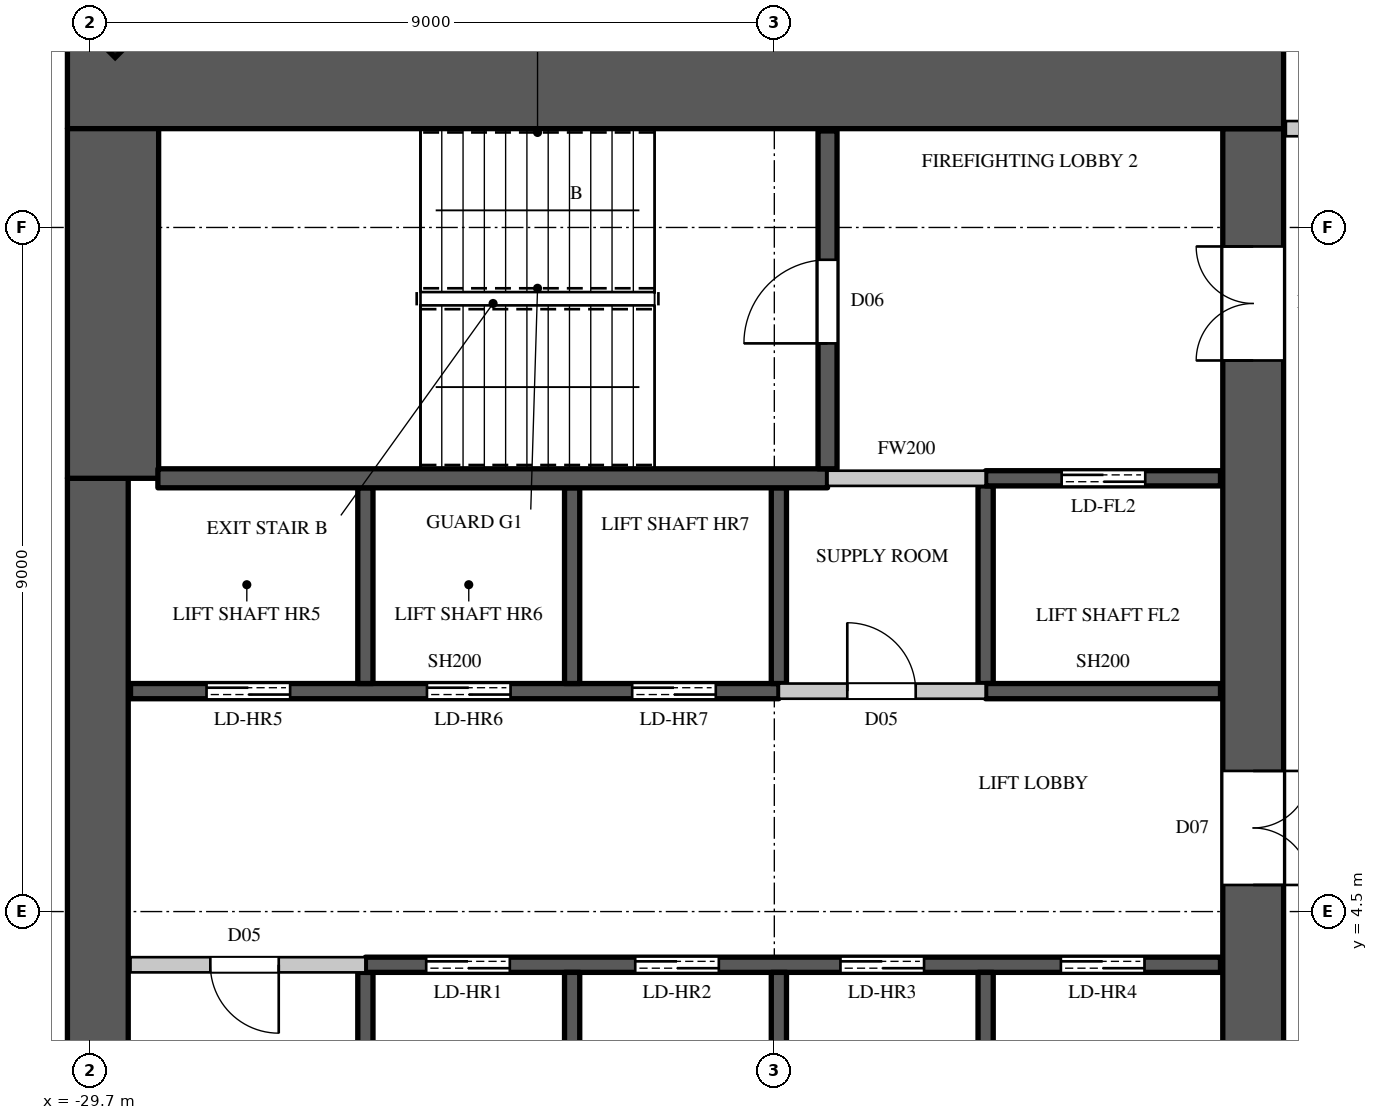
"""IFC4 building model, lengths in metres.
Left out: names, types, materials, properties, quantities, classifications, styles, units other than length and angle.
Written with IfcOpenShell. Run it as: python <this file> out.ifc"""

import sys

from ifc_helpers import new_model, si_unit, direction, frame, frame_2d, origin, origin_2d, place, context, subcontext, project, spatial, rectangle, extrude, element, fill, save


model = new_model("IFC4")
c1 = context("Model", 3, precision=1e-05, world=origin(), true_north=direction((0.0, 1.0)))
c2 = subcontext(c1, "Body", "Model", "MODEL_VIEW")
j1 = project(units=[si_unit("LENGTHUNIT", "METRE"), si_unit("PLANEANGLEUNIT", "RADIAN")], contexts=[c1])
p1 = place(None, origin())
s1 = spatial("IfcSite", under=j1, at=p1, CompositionType="ELEMENT")
p2 = place(p1, origin())
s2 = spatial("IfcBuilding", under=s1, at=p2, CompositionType="ELEMENT")
p3 = place(p2, frame((0.0, 0.0, 234.3)))
s3 = spatial("IfcBuildingStorey", under=s2, at=p3, CompositionType="ELEMENT", Elevation=234.3)
p4 = place(p3, frame((-29.443, 16.443, 0.0), z_axis=(0.0, 0.0, 1.0), x_axis=(-0.707106781187, -0.707106781187, 0.0)))
e1 = element("IfcColumn", 1, at=p4, inside=s3, PredefinedType="COLUMN", context=c2, shape_type="SweptSolid", body=[
    extrude(rectangle(XDim=0.9, YDim=1.1, at=origin_2d()), origin(), (0.0, 0.0, 1.0), 4.1),
])
p5 = place(p3, frame((-30.0, 15.4, 0.0), z_axis=(0.0, 0.0, 1.0), x_axis=(1.0, 0.0, 0.0)))
e2 = element("IfcWall", 2, at=p5, inside=s3, PredefinedType="SHEAR", context=c2, shape_type="SweptSolid", body=[
    extrude(rectangle(XDim=16.0, YDim=1.2, at=frame_2d((8.0, 0.0))), origin(), (0.0, 0.0, 1.0), 4.1),
])
p6 = place(p3, frame((-14.4, -14.8, 0.0), z_axis=(0.0, 0.0, 1.0), x_axis=(0.0, 1.0, 0.0)))
e3 = element("IfcWall", 3, at=p6, inside=s3, PredefinedType="SHEAR", context=c2, shape_type="SweptSolid", body=[
    extrude(rectangle(XDim=29.6, YDim=0.8, at=frame_2d((14.8, 0.0))), origin(), (0.0, 0.0, 1.0), 4.1),
])
p7 = place(p6, frame((1.55, 0.0, 0.0)))
e4 = element("IfcOpeningElement", 4, at=p7, cuts=e3, PredefinedType="OPENING", context=c2, shape_type="SweptSolid", body=[
    extrude(rectangle(XDim=1.5, YDim=2.4, at=frame_2d((0.75, 1.2))), frame((0.0, 0.41, 0.0), z_axis=(0.0, -1.0, 0.0), x_axis=(1.0, 0.0, 0.0)), (0.0, 0.0, 1.0), 0.82),
])
p8 = place(p6, frame((26.55, 0.0, 0.0)))
e5 = element("IfcOpeningElement", 5, at=p8, cuts=e3, PredefinedType="OPENING", context=c2, shape_type="SweptSolid", body=[
    extrude(rectangle(XDim=1.5, YDim=2.4, at=frame_2d((0.75, 1.2))), frame((0.0, 0.41, 0.0), z_axis=(0.0, -1.0, 0.0), x_axis=(1.0, 0.0, 0.0)), (0.0, 0.0, 1.0), 0.82),
])
p9 = place(p6, frame((8.45, 0.0, 0.0)))
e6 = element("IfcOpeningElement", 6, at=p9, cuts=e3, PredefinedType="OPENING", context=c2, shape_type="SweptSolid", body=[
    extrude(rectangle(XDim=1.5, YDim=2.4, at=frame_2d((0.75, 1.2))), frame((0.0, 0.41, 0.0), z_axis=(0.0, -1.0, 0.0), x_axis=(1.0, 0.0, 0.0)), (0.0, 0.0, 1.0), 0.82),
])
p10 = place(p6, frame((19.65, 0.0, 0.0)))
e7 = element("IfcOpeningElement", 7, at=p10, cuts=e3, PredefinedType="OPENING", context=c2, shape_type="SweptSolid", body=[
    extrude(rectangle(XDim=1.5, YDim=2.4, at=frame_2d((0.75, 1.2))), frame((0.0, 0.41, 0.0), z_axis=(0.0, -1.0, 0.0), x_axis=(1.0, 0.0, 0.0)), (0.0, 0.0, 1.0), 0.82),
])
p11 = place(p6, frame((14.5, 0.0, 0.0)))
e8 = element("IfcOpeningElement", 8, at=p11, cuts=e3, PredefinedType="OPENING", context=c2, shape_type="SweptSolid", body=[
    extrude(rectangle(XDim=0.6, YDim=2.0, at=frame_2d((0.3, 1.0))), frame((0.0, 0.41, 0.0), z_axis=(0.0, -1.0, 0.0), x_axis=(1.0, 0.0, 0.0)), (0.0, 0.0, 1.0), 0.82),
])
p12 = place(p3, frame((-29.6, -10.2, 0.0), z_axis=(0.0, 0.0, 1.0), x_axis=(0.0, 1.0, 0.0)))
e9 = element("IfcWall", 9, at=p12, inside=s3, PredefinedType="SHEAR", context=c2, shape_type="SweptSolid", body=[
    extrude(rectangle(XDim=20.4, YDim=0.8, at=frame_2d((10.2, 0.0))), origin(), (0.0, 0.0, 1.0), 4.1),
])
p13 = place(p3, frame((-29.4, 10.2, 0.0), z_axis=(0.0, 0.0, 1.0), x_axis=(0.0, 1.0, 0.0)))
e10 = element("IfcWall", 10, at=p13, inside=s3, PredefinedType="SHEAR", context=c2, shape_type="SweptSolid", body=[
    extrude(rectangle(XDim=4.6, YDim=1.2, at=frame_2d((2.3, 0.0))), origin(), (0.0, 0.0, 1.0), 4.1),
])
p14 = place(p3, frame((-29.17, 3.8, 0.0), z_axis=(0.0, 0.0, 1.0), x_axis=(1.0, 0.0, 0.0)))
e11 = element("IfcWall", 11, at=p14, inside=s3, PredefinedType="PARTITIONING", context=c2, shape_type="SweptSolid", body=[
    extrude(rectangle(XDim=3.09, YDim=0.2, at=frame_2d((1.545, 0.0))), origin(), (0.0, 0.0, 1.0), 3.8),
])
p15 = place(p14, frame((1.05, 0.0, 0.0)))
e12 = element("IfcOpeningElement", 12, at=p15, cuts=e11, PredefinedType="OPENING", context=c2, shape_type="SweptSolid", body=[
    extrude(rectangle(XDim=0.9, YDim=2.2, at=frame_2d((0.45, 1.1))), frame((0.0, 0.11, 0.0), z_axis=(0.0, -1.0, 0.0), x_axis=(1.0, 0.0, 0.0)), (0.0, 0.0, 1.0), 0.22),
])
p16 = place(p3, frame((-20.64, 7.4, 0.0), z_axis=(0.0, 0.0, 1.0), x_axis=(1.0, 0.0, 0.0)))
e13 = element("IfcWall", 13, at=p16, inside=s3, PredefinedType="PARTITIONING", context=c2, shape_type="SweptSolid", body=[
    extrude(rectangle(XDim=2.72, YDim=0.2, at=frame_2d((1.36, 0.0))), origin(), (0.0, 0.0, 1.0), 3.8),
])
p17 = place(p16, frame((0.9, 0.0, 0.0)))
e14 = element("IfcOpeningElement", 14, at=p17, cuts=e13, PredefinedType="OPENING", context=c2, shape_type="SweptSolid", body=[
    extrude(rectangle(XDim=0.9, YDim=2.2, at=frame_2d((0.45, 1.1))), frame((0.0, 0.11, 0.0), z_axis=(0.0, -1.0, 0.0), x_axis=(1.0, 0.0, 0.0)), (0.0, 0.0, 1.0), 0.22),
])
p18 = place(p3, frame((-20.0, 10.2, 0.0), z_axis=(0.0, 0.0, 1.0), x_axis=(1.0, 0.0, 0.0)))
e15 = element("IfcWall", 15, at=p18, inside=s3, PredefinedType="PARTITIONING", context=c2, shape_type="SweptSolid", body=[
    extrude(rectangle(XDim=2.08, YDim=0.2, at=frame_2d((1.04, 0.0))), origin(), (0.0, 0.0, 1.0), 3.8),
])
p19 = place(p3, frame((-13.97, 14.8, 0.0), z_axis=(0.0, 0.0, 1.0), x_axis=(1.0, 0.0, 0.0)))
e16 = element("IfcWall", 16, at=p19, inside=s3, PredefinedType="PARTITIONING", context=c2, shape_type="SweptSolid", body=[
    extrude(rectangle(XDim=2.87, YDim=0.2, at=frame_2d((1.435, 0.0))), origin(), (0.0, 0.0, 1.0), 3.8),
])
p20 = place(p3, frame((-29.17, 7.4, 0.0), z_axis=(0.0, 0.0, 1.0), x_axis=(1.0, 0.0, 0.0)))
e17 = element("IfcWall", 17, at=p20, inside=s3, PredefinedType="SHEAR", context=c2, shape_type="SweptSolid", body=[
    extrude(rectangle(XDim=8.53, YDim=0.2, at=frame_2d((4.265, 0.0))), origin(), (0.0, 0.0, 1.0), 3.8),
])
p21 = place(p20, frame((1.0, 0.0, 0.0)))
e18 = element("IfcOpeningElement", 18, at=p21, cuts=e17, PredefinedType="OPENING", context=c2, shape_type="SweptSolid", body=[
    extrude(rectangle(XDim=1.1, YDim=2.2, at=frame_2d((0.55, 1.1))), frame((0.0, 0.11, 0.0), z_axis=(0.0, -1.0, 0.0), x_axis=(1.0, 0.0, 0.0)), (0.0, 0.0, 1.0), 0.22),
])
p22 = place(p20, frame((3.9, 0.0, 0.0)))
e19 = element("IfcOpeningElement", 19, at=p22, cuts=e17, PredefinedType="OPENING", context=c2, shape_type="SweptSolid", body=[
    extrude(rectangle(XDim=1.1, YDim=2.2, at=frame_2d((0.55, 1.1))), frame((0.0, 0.11, 0.0), z_axis=(0.0, -1.0, 0.0), x_axis=(1.0, 0.0, 0.0)), (0.0, 0.0, 1.0), 0.22),
])
p23 = place(p20, frame((6.6, 0.0, 0.0)))
e20 = element("IfcOpeningElement", 20, at=p23, cuts=e17, PredefinedType="OPENING", context=c2, shape_type="SweptSolid", body=[
    extrude(rectangle(XDim=1.1, YDim=2.2, at=frame_2d((0.55, 1.1))), frame((0.0, 0.11, 0.0), z_axis=(0.0, -1.0, 0.0), x_axis=(1.0, 0.0, 0.0)), (0.0, 0.0, 1.0), 0.22),
])
p24 = place(p3, frame((-26.08, 1.1, 0.0), z_axis=(0.0, 0.0, 1.0), x_axis=(0.0, 1.0, 0.0)))
e21 = element("IfcWall", 21, at=p24, inside=s3, PredefinedType="SHEAR", context=c2, shape_type="SweptSolid", body=[
    extrude(rectangle(XDim=2.6, YDim=0.2, at=frame_2d((1.3, 0.0))), origin(), (0.0, 0.0, 1.0), 3.8),
])
p25 = place(p3, frame((-26.08, 3.8, 0.0), z_axis=(0.0, 0.0, 1.0), x_axis=(1.0, 0.0, 0.0)))
e22 = element("IfcWall", 22, at=p25, inside=s3, PredefinedType="SHEAR", context=c2, shape_type="SweptSolid", body=[
    extrude(rectangle(XDim=11.25, YDim=0.2, at=frame_2d((5.625, 0.0))), origin(), (0.0, 0.0, 1.0), 3.8),
])
p26 = place(p25, frame((0.8, 0.0, 0.0)))
e23 = element("IfcOpeningElement", 23, at=p26, cuts=e22, PredefinedType="OPENING", context=c2, shape_type="SweptSolid", body=[
    extrude(rectangle(XDim=1.1, YDim=2.2, at=frame_2d((0.55, 1.1))), frame((0.0, 0.11, 0.0), z_axis=(0.0, -1.0, 0.0), x_axis=(1.0, 0.0, 0.0)), (0.0, 0.0, 1.0), 0.22),
])
p27 = place(p25, frame((3.55, 0.0, 0.0)))
e24 = element("IfcOpeningElement", 24, at=p27, cuts=e22, PredefinedType="OPENING", context=c2, shape_type="SweptSolid", body=[
    extrude(rectangle(XDim=1.1, YDim=2.2, at=frame_2d((0.55, 1.1))), frame((0.0, 0.11, 0.0), z_axis=(0.0, -1.0, 0.0), x_axis=(1.0, 0.0, 0.0)), (0.0, 0.0, 1.0), 0.22),
])
p28 = place(p25, frame((6.25, 0.0, 0.0)))
e25 = element("IfcOpeningElement", 25, at=p28, cuts=e22, PredefinedType="OPENING", context=c2, shape_type="SweptSolid", body=[
    extrude(rectangle(XDim=1.1, YDim=2.2, at=frame_2d((0.55, 1.1))), frame((0.0, 0.11, 0.0), z_axis=(0.0, -1.0, 0.0), x_axis=(1.0, 0.0, 0.0)), (0.0, 0.0, 1.0), 0.22),
])
p29 = place(p25, frame((9.15, 0.0, 0.0)))
e26 = element("IfcOpeningElement", 26, at=p29, cuts=e22, PredefinedType="OPENING", context=c2, shape_type="SweptSolid", body=[
    extrude(rectangle(XDim=1.1, YDim=2.2, at=frame_2d((0.55, 1.1))), frame((0.0, 0.11, 0.0), z_axis=(0.0, -1.0, 0.0), x_axis=(1.0, 0.0, 0.0)), (0.0, 0.0, 1.0), 0.22),
])
p30 = place(p3, frame((-26.08, 7.5, 0.0), z_axis=(0.0, 0.0, 1.0), x_axis=(0.0, 1.0, 0.0)))
e27 = element("IfcWall", 27, at=p30, inside=s3, PredefinedType="SHEAR", context=c2, shape_type="SweptSolid", body=[
    extrude(rectangle(XDim=2.575, YDim=0.2, at=frame_2d((1.288, 0.0))), origin(), (0.0, 0.0, 1.0), 4.1),
])
p31 = place(p3, frame((-23.36, 1.1, 0.0), z_axis=(0.0, 0.0, 1.0), x_axis=(0.0, 1.0, 0.0)))
e28 = element("IfcWall", 28, at=p31, inside=s3, PredefinedType="SHEAR", context=c2, shape_type="SweptSolid", body=[
    extrude(rectangle(XDim=2.6, YDim=0.2, at=frame_2d((1.3, 0.0))), origin(), (0.0, 0.0, 1.0), 3.8),
])
p32 = place(p3, frame((-23.36, 7.5, 0.0), z_axis=(0.0, 0.0, 1.0), x_axis=(0.0, 1.0, 0.0)))
e29 = element("IfcWall", 29, at=p32, inside=s3, PredefinedType="SHEAR", context=c2, shape_type="SweptSolid", body=[
    extrude(rectangle(XDim=2.575, YDim=0.2, at=frame_2d((1.288, 0.0))), origin(), (0.0, 0.0, 1.0), 4.1),
])
p33 = place(p3, frame((-20.64, 1.1, 0.0), z_axis=(0.0, 0.0, 1.0), x_axis=(0.0, 1.0, 0.0)))
e30 = element("IfcWall", 30, at=p33, inside=s3, PredefinedType="SHEAR", context=c2, shape_type="SweptSolid", body=[
    extrude(rectangle(XDim=2.6, YDim=0.2, at=frame_2d((1.3, 0.0))), origin(), (0.0, 0.0, 1.0), 3.8),
])
p34 = place(p3, frame((-20.64, 7.5, 0.0), z_axis=(0.0, 0.0, 1.0), x_axis=(0.0, 1.0, 0.0)))
e31 = element("IfcWall", 31, at=p34, inside=s3, PredefinedType="SHEAR", context=c2, shape_type="SweptSolid", body=[
    extrude(rectangle(XDim=2.575, YDim=0.2, at=frame_2d((1.288, 0.0))), origin(), (0.0, 0.0, 1.0), 3.8),
])
p35 = place(p3, frame((-17.92, 1.1, 0.0), z_axis=(0.0, 0.0, 1.0), x_axis=(0.0, 1.0, 0.0)))
e32 = element("IfcWall", 32, at=p35, inside=s3, PredefinedType="SHEAR", context=c2, shape_type="SweptSolid", body=[
    extrude(rectangle(XDim=2.6, YDim=0.2, at=frame_2d((1.3, 0.0))), origin(), (0.0, 0.0, 1.0), 3.8),
])
p36 = place(p3, frame((-17.92, 7.5, 0.0), z_axis=(0.0, 0.0, 1.0), x_axis=(0.0, 1.0, 0.0)))
e33 = element("IfcWall", 33, at=p36, inside=s3, PredefinedType="SHEAR", context=c2, shape_type="SweptSolid", body=[
    extrude(rectangle(XDim=2.6, YDim=0.2, at=frame_2d((1.3, 0.0))), origin(), (0.0, 0.0, 1.0), 3.8),
])
p37 = place(p3, frame((-17.92, 7.4, 0.0), z_axis=(0.0, 0.0, 1.0), x_axis=(1.0, 0.0, 0.0)))
e34 = element("IfcWall", 34, at=p37, inside=s3, PredefinedType="SHEAR", context=c2, shape_type="SweptSolid", body=[
    extrude(rectangle(XDim=3.09, YDim=0.2, at=frame_2d((1.545, 0.0))), origin(), (0.0, 0.0, 1.0), 3.8),
])
p38 = place(p3, frame((-17.92, 10.2, 0.0), z_axis=(0.0, 0.0, 1.0), x_axis=(1.0, 0.0, 0.0)))
e35 = element("IfcWall", 35, at=p38, inside=s3, PredefinedType="SHEAR", context=c2, shape_type="SweptSolid", body=[
    extrude(rectangle(XDim=3.09, YDim=0.2, at=frame_2d((1.545, 0.0))), origin(), (0.0, 0.0, 1.0), 3.8),
])
p39 = place(p38, frame((1.0, 0.0, 0.0)))
e36 = element("IfcOpeningElement", 36, at=p39, cuts=e35, PredefinedType="OPENING", context=c2, shape_type="SweptSolid", body=[
    extrude(rectangle(XDim=1.1, YDim=2.2, at=frame_2d((0.55, 1.1))), frame((0.0, 0.11, 0.0), z_axis=(0.0, -1.0, 0.0), x_axis=(1.0, 0.0, 0.0)), (0.0, 0.0, 1.0), 0.22),
])
p40 = place(p3, frame((-28.81, 10.2, 0.0), z_axis=(0.0, 0.0, 1.0), x_axis=(1.0, 0.0, 0.0)))
e37 = element("IfcWall", 37, at=p40, inside=s3, PredefinedType="SHEAR", context=c2, shape_type="SweptSolid", body=[
    extrude(rectangle(XDim=8.81, YDim=0.25, at=frame_2d((4.405, 0.0))), origin(), (0.0, 0.0, 1.0), 3.8),
])
p41 = place(p3, frame((-20.0, 10.325, 0.0), z_axis=(0.0, 0.0, 1.0), x_axis=(0.0, 1.0, 0.0)))
e38 = element("IfcWall", 38, at=p41, inside=s3, PredefinedType="SHEAR", context=c2, shape_type="SweptSolid", body=[
    extrude(rectangle(XDim=4.445, YDim=0.25, at=frame_2d((2.223, 0.0))), origin(), (0.0, 0.0, 1.0), 3.8),
])
p42 = place(p41, frame((1.65, 0.0, 0.0)))
e39 = element("IfcOpeningElement", 39, at=p42, cuts=e38, PredefinedType="OPENING", context=c2, shape_type="SweptSolid", body=[
    extrude(rectangle(XDim=1.1, YDim=2.2, at=frame_2d((0.55, 1.1))), frame((0.0, 0.135, 0.0), z_axis=(0.0, -1.0, 0.0), x_axis=(1.0, 0.0, 0.0)), (0.0, 0.0, 1.0), 0.27),
])
p43 = place(p42, origin())
e40 = element("IfcDoor", 40, at=p43, inside=s3, OperationType="SINGLE_SWING_LEFT", PredefinedType="DOOR", context=c2, shape_type="SweptSolid", body=[
    extrude(rectangle(XDim=1.1, YDim=2.2, at=frame_2d((0.55, 1.1))), frame((0.0, 0.025, 0.0), z_axis=(0.0, -1.0, 0.0), x_axis=(1.0, 0.0, 0.0)), (0.0, 0.0, 1.0), 0.05),
])
fill(e39, e40)
p44 = place(p15, origin())
e41 = element("IfcDoor", 41, at=p44, inside=s3, OperationType="SINGLE_SWING_LEFT", PredefinedType="DOOR", context=c2, shape_type="SweptSolid", body=[
    extrude(rectangle(XDim=0.9, YDim=2.2, at=frame_2d((0.45, 1.1))), frame((0.0, 0.025, 0.0), z_axis=(0.0, -1.0, 0.0), x_axis=(1.0, 0.0, 0.0)), (0.0, 0.0, 1.0), 0.05),
])
fill(e12, e41)
p45 = place(p17, origin())
e42 = element("IfcDoor", 42, at=p45, inside=s3, OperationType="SINGLE_SWING_LEFT", PredefinedType="DOOR", context=c2, shape_type="SweptSolid", body=[
    extrude(rectangle(XDim=0.9, YDim=2.2, at=frame_2d((0.45, 1.1))), frame((0.0, 0.025, 0.0), z_axis=(0.0, -1.0, 0.0), x_axis=(1.0, 0.0, 0.0)), (0.0, 0.0, 1.0), 0.05),
])
fill(e14, e42)
p46 = place(p26, origin())
e43 = element("IfcDoor", 43, at=p46, inside=s3, OperationType="DOUBLE_DOOR_SLIDING", PredefinedType="DOOR", context=c2, shape_type="SweptSolid", body=[
    extrude(rectangle(XDim=1.1, YDim=2.2, at=frame_2d((0.55, 1.1))), frame((0.0, 0.025, 0.0), z_axis=(0.0, -1.0, 0.0), x_axis=(1.0, 0.0, 0.0)), (0.0, 0.0, 1.0), 0.05),
])
fill(e23, e43)
p47 = place(p27, origin())
e44 = element("IfcDoor", 44, at=p47, inside=s3, OperationType="DOUBLE_DOOR_SLIDING", PredefinedType="DOOR", context=c2, shape_type="SweptSolid", body=[
    extrude(rectangle(XDim=1.1, YDim=2.2, at=frame_2d((0.55, 1.1))), frame((0.0, 0.025, 0.0), z_axis=(0.0, -1.0, 0.0), x_axis=(1.0, 0.0, 0.0)), (0.0, 0.0, 1.0), 0.05),
])
fill(e24, e44)
p48 = place(p28, origin())
e45 = element("IfcDoor", 45, at=p48, inside=s3, OperationType="DOUBLE_DOOR_SLIDING", PredefinedType="DOOR", context=c2, shape_type="SweptSolid", body=[
    extrude(rectangle(XDim=1.1, YDim=2.2, at=frame_2d((0.55, 1.1))), frame((0.0, 0.025, 0.0), z_axis=(0.0, -1.0, 0.0), x_axis=(1.0, 0.0, 0.0)), (0.0, 0.0, 1.0), 0.05),
])
fill(e25, e45)
p49 = place(p29, origin())
e46 = element("IfcDoor", 46, at=p49, inside=s3, OperationType="DOUBLE_DOOR_SLIDING", PredefinedType="DOOR", context=c2, shape_type="SweptSolid", body=[
    extrude(rectangle(XDim=1.1, YDim=2.2, at=frame_2d((0.55, 1.1))), frame((0.0, 0.025, 0.0), z_axis=(0.0, -1.0, 0.0), x_axis=(1.0, 0.0, 0.0)), (0.0, 0.0, 1.0), 0.05),
])
fill(e26, e46)
p50 = place(p21, origin())
e47 = element("IfcDoor", 47, at=p50, inside=s3, OperationType="DOUBLE_DOOR_SLIDING", PredefinedType="DOOR", context=c2, shape_type="SweptSolid", body=[
    extrude(rectangle(XDim=1.1, YDim=2.2, at=frame_2d((0.55, 1.1))), frame((0.0, 0.025, 0.0), z_axis=(0.0, -1.0, 0.0), x_axis=(1.0, 0.0, 0.0)), (0.0, 0.0, 1.0), 0.05),
])
fill(e18, e47)
p51 = place(p22, origin())
e48 = element("IfcDoor", 48, at=p51, inside=s3, OperationType="DOUBLE_DOOR_SLIDING", PredefinedType="DOOR", context=c2, shape_type="SweptSolid", body=[
    extrude(rectangle(XDim=1.1, YDim=2.2, at=frame_2d((0.55, 1.1))), frame((0.0, 0.025, 0.0), z_axis=(0.0, -1.0, 0.0), x_axis=(1.0, 0.0, 0.0)), (0.0, 0.0, 1.0), 0.05),
])
fill(e19, e48)
p52 = place(p23, origin())
e49 = element("IfcDoor", 49, at=p52, inside=s3, OperationType="DOUBLE_DOOR_SLIDING", PredefinedType="DOOR", context=c2, shape_type="SweptSolid", body=[
    extrude(rectangle(XDim=1.1, YDim=2.2, at=frame_2d((0.55, 1.1))), frame((0.0, 0.025, 0.0), z_axis=(0.0, -1.0, 0.0), x_axis=(1.0, 0.0, 0.0)), (0.0, 0.0, 1.0), 0.05),
])
fill(e20, e49)
p53 = place(p39, origin())
e50 = element("IfcDoor", 50, at=p53, inside=s3, OperationType="DOUBLE_DOOR_SLIDING", PredefinedType="DOOR", context=c2, shape_type="SweptSolid", body=[
    extrude(rectangle(XDim=1.1, YDim=2.2, at=frame_2d((0.55, 1.1))), frame((0.0, 0.025, 0.0), z_axis=(0.0, -1.0, 0.0), x_axis=(1.0, 0.0, 0.0)), (0.0, 0.0, 1.0), 0.05),
])
fill(e36, e50)
p54 = place(p8, origin())
e51 = element("IfcDoor", 51, at=p54, inside=s3, OperationType="DOUBLE_DOOR_SINGLE_SWING", PredefinedType="DOOR", context=c2, shape_type="SweptSolid", body=[
    extrude(rectangle(XDim=1.5, YDim=2.4, at=frame_2d((0.75, 1.2))), frame((0.0, 0.395, 0.0), z_axis=(0.0, -1.0, 0.0), x_axis=(1.0, 0.0, 0.0)), (0.0, 0.0, 1.0), 0.05),
])
fill(e5, e51)
p55 = place(p10, origin())
e52 = element("IfcDoor", 52, at=p55, inside=s3, OperationType="DOUBLE_DOOR_SINGLE_SWING", PredefinedType="DOOR", context=c2, shape_type="SweptSolid", body=[
    extrude(rectangle(XDim=1.5, YDim=2.4, at=frame_2d((0.75, 1.2))), frame((0.0, -0.345, 0.0), z_axis=(0.0, -1.0, 0.0), x_axis=(1.0, 0.0, 0.0)), (0.0, 0.0, 1.0), 0.05),
])
fill(e7, e52)
save(model, sys.argv[1])
